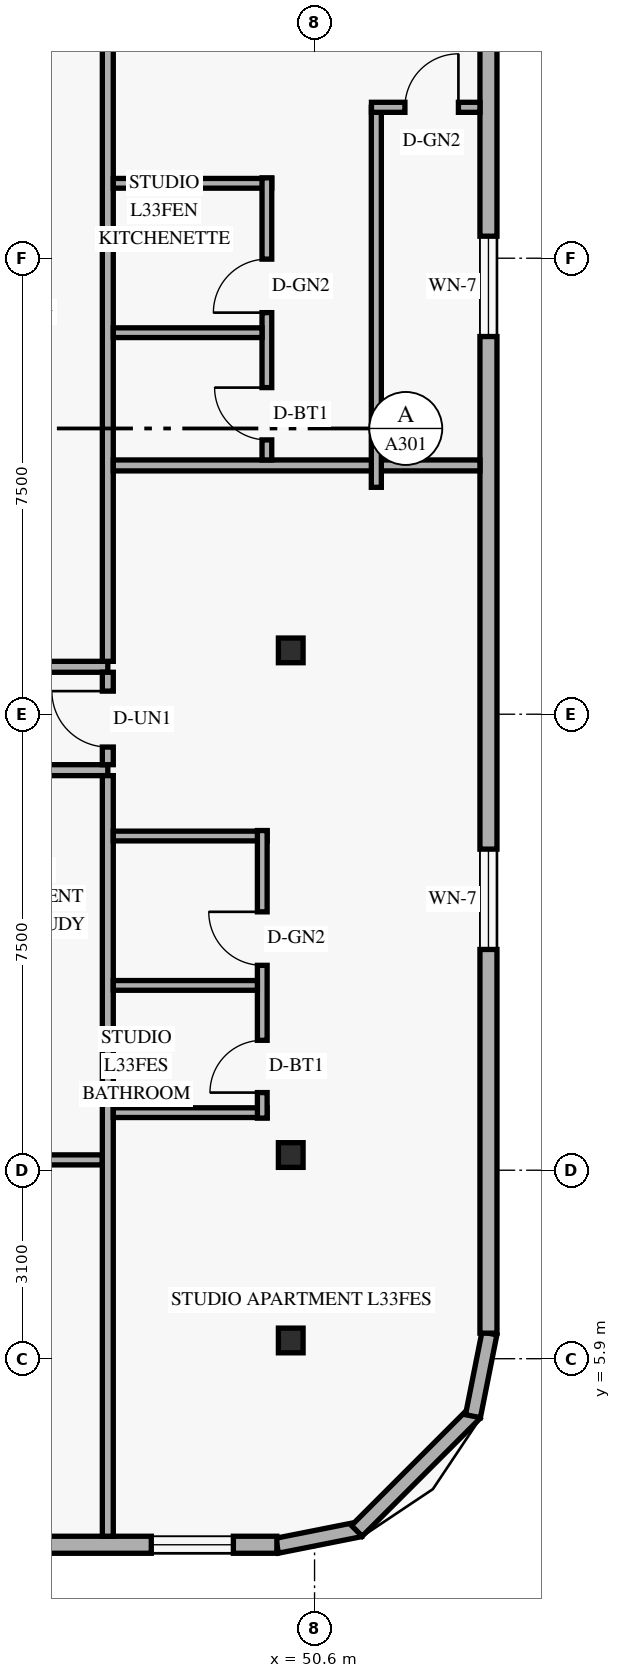
"""IFC4 building model, lengths in metres.
Left out: names, types, materials, properties, quantities, classifications, styles, units other than length and angle.
Written with IfcOpenShell. Run it as: python <this file> out.ifc"""

import sys

from ifc_helpers import new_model, si_unit, direction, frame, frame_2d, origin, origin_2d, place, context, subcontext, project, spatial, rectangle, hollow_rectangle, extrude, element, fill, save


model = new_model("IFC4")
c1 = context("Model", 3, precision=1e-05, world=origin(), true_north=direction((0.0, 1.0)))
c2 = subcontext(c1, "Body", "Model", "MODEL_VIEW")
j1 = project(units=[si_unit("LENGTHUNIT", "METRE"), si_unit("PLANEANGLEUNIT", "RADIAN")], contexts=[c1])
p1 = place(None, origin())
s1 = spatial("IfcSite", under=j1, at=p1, CompositionType="ELEMENT")
p2 = place(p1, origin())
s2 = spatial("IfcBuilding", under=s1, at=p2, CompositionType="ELEMENT")
p3 = place(p2, frame((0.0, 0.0, 128.4)))
s3 = spatial("IfcBuildingStorey", under=s2, at=p3, CompositionType="ELEMENT", Elevation=128.4)
for number, where, z_axis, x_axis in (
    (1, (50.104, 6.2, 0.0), (0.058, 0.0, 0.998), (0.0, 1.0, 0.0)),
    (2, (50.104, 9.25, 0.0), (0.058, 0.0, 0.998), (0.0, 1.0, 0.0)),
    (3, (50.104, 17.55, 0.0), (0.058, 0.0, 0.998), (0.0, 1.0, 0.0)),
):
    element("IfcColumn", number, at=place(p3, frame(where, z_axis=z_axis, x_axis=x_axis)), inside=s3, PredefinedType="COLUMN", context=c2, shape_type="SweptSolid", body=[
        extrude(hollow_rectangle(XDim=0.406, YDim=0.406, WallThickness=0.016, at=origin_2d()), origin(), (0.0, 0.0, 1.0), 3.606),
    ])
p4 = place(p3, frame((49.983, 2.824, 0.0), z_axis=(0.0, 0.0, 1.0), x_axis=(0.980809899341, 0.19496651342, 0.0)))
e4 = element("IfcWall", 4, at=p4, inside=s3, PredefinedType="SOLIDWALL", context=c2, shape_type="SweptSolid", body=[
    extrude(rectangle(XDim=1.389, YDim=0.25, at=frame_2d((0.694, 0.0))), origin(), (0.0, 0.0, 1.0), 3.36),
])
p5 = place(p3, frame((51.295, 3.068, 0.0), z_axis=(0.0, 0.0, 1.0), x_axis=(0.707151344399, 0.707062215165, 0.0)))
e5 = element("IfcWall", 5, at=p5, inside=s3, PredefinedType="SOLIDWALL", context=c2, shape_type="SweptSolid", body=[
    extrude(rectangle(XDim=2.739, YDim=0.25, at=frame_2d((1.37, 0.0))), origin(), (0.0, 0.0, 1.0), 3.36),
])
p6 = place(p3, frame((53.205, 4.955, 0.0), z_axis=(0.0, 0.0, 1.0), x_axis=(0.195000137217, 0.980803214965, 0.0)))
e6 = element("IfcWall", 6, at=p6, inside=s3, PredefinedType="SOLIDWALL", context=c2, shape_type="SweptSolid", body=[
    extrude(rectangle(XDim=1.388, YDim=0.25, at=frame_2d((0.694, 0.0))), origin(), (0.0, 0.0, 1.0), 3.36),
])
p7 = place(p3, frame((13.42, 2.84, 0.0), z_axis=(0.0, 0.0, 1.0), x_axis=(1.0, 0.0, 0.0)))
e7 = element("IfcWall", 7, at=p7, inside=s3, PredefinedType="SOLIDWALL", context=c2, shape_type="SweptSolid", body=[
    extrude(rectangle(XDim=36.56, YDim=0.28, at=frame_2d((18.28, 0.0))), origin(), (0.0, 0.0, 1.0), 3.36),
])
p8 = place(p7, frame((4.07, 0.0, 0.85)))
e8 = element("IfcOpeningElement", 8, at=p8, cuts=e7, PredefinedType="OPENING", context=c2, shape_type="SweptSolid", body=[
    extrude(rectangle(XDim=1.35, YDim=1.55, at=frame_2d((0.675, 0.775))), frame((0.0, 0.15, 0.0), z_axis=(0.0, -1.0, 0.0), x_axis=(1.0, 0.0, 0.0)), (0.0, 0.0, 1.0), 0.3),
])
p9 = place(p7, frame((9.93, 0.0, 0.85)))
e9 = element("IfcOpeningElement", 9, at=p9, cuts=e7, PredefinedType="OPENING", context=c2, shape_type="SweptSolid", body=[
    extrude(rectangle(XDim=1.35, YDim=1.55, at=frame_2d((0.675, 0.775))), frame((0.0, 0.15, 0.0), z_axis=(0.0, -1.0, 0.0), x_axis=(1.0, 0.0, 0.0)), (0.0, 0.0, 1.0), 0.3),
])
p10 = place(p7, frame((16.815, 0.0, 0.85)))
e10 = element("IfcOpeningElement", 10, at=p10, cuts=e7, PredefinedType="OPENING", context=c2, shape_type="SweptSolid", body=[
    extrude(rectangle(XDim=1.35, YDim=1.55, at=frame_2d((0.675, 0.775))), frame((0.0, 0.15, 0.0), z_axis=(0.0, -1.0, 0.0), x_axis=(1.0, 0.0, 0.0)), (0.0, 0.0, 1.0), 0.3),
])
p11 = place(p7, frame((22.39, 0.0, 0.85)))
e11 = element("IfcOpeningElement", 11, at=p11, cuts=e7, PredefinedType="OPENING", context=c2, shape_type="SweptSolid", body=[
    extrude(rectangle(XDim=1.35, YDim=1.55, at=frame_2d((0.675, 0.775))), frame((0.0, 0.15, 0.0), z_axis=(0.0, -1.0, 0.0), x_axis=(1.0, 0.0, 0.0)), (0.0, 0.0, 1.0), 0.3),
])
p12 = place(p7, frame((26.55, 0.0, 0.85)))
e12 = element("IfcOpeningElement", 12, at=p12, cuts=e7, PredefinedType="OPENING", context=c2, shape_type="SweptSolid", body=[
    extrude(rectangle(XDim=1.35, YDim=1.55, at=frame_2d((0.675, 0.775))), frame((0.0, 0.15, 0.0), z_axis=(0.0, -1.0, 0.0), x_axis=(1.0, 0.0, 0.0)), (0.0, 0.0, 1.0), 0.3),
])
p13 = place(p7, frame((31.375, 0.0, 0.85)))
e13 = element("IfcOpeningElement", 13, at=p13, cuts=e7, PredefinedType="OPENING", context=c2, shape_type="SweptSolid", body=[
    extrude(rectangle(XDim=1.35, YDim=1.55, at=frame_2d((0.675, 0.775))), frame((0.0, 0.15, 0.0), z_axis=(0.0, -1.0, 0.0), x_axis=(1.0, 0.0, 0.0)), (0.0, 0.0, 1.0), 0.3),
])
p14 = place(p7, frame((34.495, 0.0, 0.85)))
e14 = element("IfcOpeningElement", 14, at=p14, cuts=e7, PredefinedType="OPENING", context=c2, shape_type="SweptSolid", body=[
    extrude(rectangle(XDim=1.35, YDim=1.55, at=frame_2d((0.675, 0.775))), frame((0.0, 0.15, 0.0), z_axis=(0.0, -1.0, 0.0), x_axis=(1.0, 0.0, 0.0)), (0.0, 0.0, 1.0), 0.3),
])
p15 = place(p3, frame((53.46, 6.32, 0.0), z_axis=(0.0, 0.0, 1.0), x_axis=(0.0, 1.0, 0.0)))
e15 = element("IfcWall", 15, at=p15, inside=s3, PredefinedType="SOLIDWALL", context=c2, shape_type="SweptSolid", body=[
    extrude(rectangle(XDim=35.36, YDim=0.28, at=frame_2d((17.68, 0.0))), origin(), (0.0, 0.0, 1.0), 3.36),
])
p16 = place(p15, frame((6.311, 0.0, 0.85)))
e16 = element("IfcOpeningElement", 16, at=p16, cuts=e15, PredefinedType="OPENING", context=c2, shape_type="SweptSolid", body=[
    extrude(rectangle(XDim=1.65, YDim=1.6, at=frame_2d((0.825, 0.8))), frame((0.0, 0.15, 0.0), z_axis=(0.0, -1.0, 0.0), x_axis=(1.0, 0.0, 0.0)), (0.0, 0.0, 1.0), 0.3),
])
p17 = place(p15, frame((16.392, 0.0, 0.85)))
e17 = element("IfcOpeningElement", 17, at=p17, cuts=e15, PredefinedType="OPENING", context=c2, shape_type="SweptSolid", body=[
    extrude(rectangle(XDim=1.65, YDim=1.6, at=frame_2d((0.825, 0.8))), frame((0.0, 0.15, 0.0), z_axis=(0.0, -1.0, 0.0), x_axis=(1.0, 0.0, 0.0)), (0.0, 0.0, 1.0), 0.3),
])
p18 = place(p15, frame((26.936, 0.0, 0.85)))
e18 = element("IfcOpeningElement", 18, at=p18, cuts=e15, PredefinedType="OPENING", context=c2, shape_type="SweptSolid", body=[
    extrude(rectangle(XDim=1.65, YDim=1.6, at=frame_2d((0.825, 0.8))), frame((0.0, 0.15, 0.0), z_axis=(0.0, -1.0, 0.0), x_axis=(1.0, 0.0, 0.0)), (0.0, 0.0, 1.0), 0.3),
])
p19 = place(p3, frame((37.633, 15.58, 0.0), z_axis=(0.0, 0.0, 1.0), x_axis=(1.0, 0.0, 0.0)))
e19 = element("IfcWall", 19, at=p19, inside=s3, PredefinedType="STANDARD", context=c2, shape_type="SweptSolid", body=[
    extrude(rectangle(XDim=9.567, YDim=0.18, at=frame_2d((4.784, 0.0))), origin(), (0.0, 0.0, 1.0), 2.731),
])
p20 = place(p19, frame((0.327, 0.0, 0.0)))
e20 = element("IfcOpeningElement", 20, at=p20, cuts=e19, PredefinedType="OPENING", context=c2, shape_type="SweptSolid", body=[
    extrude(rectangle(XDim=0.92, YDim=2.15, at=frame_2d((0.46, 1.075))), frame((0.0, 0.1, 0.0), z_axis=(0.0, -1.0, 0.0), x_axis=(1.0, 0.0, 0.0)), (0.0, 0.0, 1.0), 0.2),
])
p21 = place(p3, frame((37.64, 17.28, 0.0), z_axis=(0.0, 0.0, 1.0), x_axis=(1.0, 0.0, 0.0)))
e21 = element("IfcWall", 21, at=p21, inside=s3, PredefinedType="STANDARD", context=c2, shape_type="SweptSolid", body=[
    extrude(rectangle(XDim=9.56, YDim=0.18, at=frame_2d((4.78, 0.0))), origin(), (0.0, 0.0, 1.0), 2.731),
])
p22 = place(p21, frame((7.528, 0.0, 0.0)))
e22 = element("IfcOpeningElement", 22, at=p22, cuts=e21, PredefinedType="OPENING", context=c2, shape_type="SweptSolid", body=[
    extrude(rectangle(XDim=0.92, YDim=2.15, at=frame_2d((0.46, 1.075))), frame((0.0, 0.1, 0.0), z_axis=(0.0, -1.0, 0.0), x_axis=(1.0, 0.0, 0.0)), (0.0, 0.0, 1.0), 0.2),
])
p23 = place(p3, frame((43.82, 9.17, 0.0), z_axis=(0.0, 0.0, 1.0), x_axis=(1.0, 0.0, 0.0)))
e23 = element("IfcWall", 23, at=p23, inside=s3, PredefinedType="PARTITIONING", context=c2, shape_type="SweptSolid", body=[
    extrude(rectangle(XDim=3.29, YDim=0.165, at=frame_2d((1.645, 0.0))), origin(), (0.0, 0.0, 1.0), 2.731),
])
p24 = place(p3, frame((47.2, 15.67, 0.0), z_axis=(0.0, 0.0, 1.0), x_axis=(0.0, 1.0, 0.0)))
e24 = element("IfcWall", 24, at=p24, inside=s3, PredefinedType="STANDARD", context=c2, shape_type="SweptSolid", body=[
    extrude(rectangle(XDim=1.52, YDim=0.18, at=frame_2d((0.76, 0.0))), origin(), (0.0, 0.0, 1.0), 3.36),
])
p25 = place(p24, frame((0.29, 0.0, 0.0)))
e25 = element("IfcOpeningElement", 25, at=p25, cuts=e24, PredefinedType="OPENING", context=c2, shape_type="SweptSolid", body=[
    extrude(rectangle(XDim=0.92, YDim=2.15, at=frame_2d((0.46, 1.075))), frame((0.0, 0.1, 0.0), z_axis=(0.0, -1.0, 0.0), x_axis=(1.0, 0.0, 0.0)), (0.0, 0.0, 1.0), 0.2),
])
p26 = place(p3, frame((47.2, 2.98, 0.0), z_axis=(0.0, 0.0, 1.0), x_axis=(0.0, 1.0, 0.0)))
e26 = element("IfcWall", 26, at=p26, inside=s3, PredefinedType="PARTITIONING", context=c2, shape_type="SweptSolid", body=[
    extrude(rectangle(XDim=12.51, YDim=0.18, at=frame_2d((6.255, 0.0))), origin(), (0.0, 0.0, 1.0), 2.731),
])
p27 = place(p3, frame((47.2, 17.37, 0.0), z_axis=(0.0, 0.0, 1.0), x_axis=(0.0, 1.0, 0.0)))
e27 = element("IfcWall", 27, at=p27, inside=s3, PredefinedType="PARTITIONING", context=c2, shape_type="SweptSolid", body=[
    extrude(rectangle(XDim=10.1, YDim=0.18, at=frame_2d((5.05, 0.0))), origin(), (0.0, 0.0, 1.0), 2.731),
])
p28 = place(p3, frame((47.29, 20.592, 0.0), z_axis=(0.0, 0.0, 1.0), x_axis=(1.0, 0.0, 0.0)))
e28 = element("IfcWall", 28, at=p28, inside=s3, PredefinedType="PARTITIONING", context=c2, shape_type="SweptSolid", body=[
    extrude(rectangle(XDim=6.03, YDim=0.18, at=frame_2d((3.015, 0.0))), origin(), (0.0, 0.0, 1.0), 2.809),
])
for number, where, z_axis, x_axis in (
    (29, (47.29, 9.947, 0.0), (0.0, 0.0, 1.0), (1.0, 0.0, 0.0)),
    (30, (47.29, 14.497, 0.0), (0.0, 0.0, 1.0), (1.0, 0.0, 0.0)),
):
    element("IfcWall", number, at=place(p3, frame(where, z_axis=z_axis, x_axis=x_axis)), inside=s3, PredefinedType="PLUMBINGWALL", context=c2, shape_type="SweptSolid", body=[
        extrude(rectangle(XDim=2.53, YDim=0.16, at=frame_2d((1.265, 0.0))), origin(), (0.0, 0.0, 1.0), 3.36),
    ])
p29 = place(p3, frame((49.74, 9.857, 0.0), z_axis=(0.0, 0.0, 1.0), x_axis=(0.0, 1.0, 0.0)))
e31 = element("IfcWall", 31, at=p29, inside=s3, PredefinedType="PLUMBINGWALL", context=c2, shape_type="SweptSolid", body=[
    extrude(rectangle(XDim=4.73, YDim=0.16, at=frame_2d((2.365, 0.0))), origin(), (0.0, 0.0, 1.0), 2.988),
])
p30 = place(p29, frame((0.42, 0.0, 0.0)))
e32 = element("IfcOpeningElement", 32, at=p30, cuts=e31, PredefinedType="OPENING", context=c2, shape_type="SweptSolid", body=[
    extrude(rectangle(XDim=0.86, YDim=2.12, at=frame_2d((0.43, 1.06))), frame((0.0, 0.09, 0.0), z_axis=(0.0, -1.0, 0.0), x_axis=(1.0, 0.0, 0.0)), (0.0, 0.0, 1.0), 0.18),
])
p31 = place(p29, frame((2.513, 0.0, 0.0)))
e33 = element("IfcOpeningElement", 33, at=p31, cuts=e31, PredefinedType="OPENING", context=c2, shape_type="SweptSolid", body=[
    extrude(rectangle(XDim=0.88, YDim=2.12, at=frame_2d((0.44, 1.06))), frame((0.0, 0.09, 0.0), z_axis=(0.0, -1.0, 0.0), x_axis=(1.0, 0.0, 0.0)), (0.0, 0.0, 1.0), 0.18),
])
p32 = place(p3, frame((47.29, 12.04, 0.0), z_axis=(0.0, 0.0, 1.0), x_axis=(1.0, 0.0, 0.0)))
e34 = element("IfcWall", 34, at=p32, inside=s3, PredefinedType="PLUMBINGWALL", context=c2, shape_type="SweptSolid", body=[
    extrude(rectangle(XDim=2.37, YDim=0.16, at=frame_2d((1.185, 0.0))), origin(), (0.0, 0.0, 1.0), 3.36),
])
p33 = place(p3, frame((47.29, 25.232, 0.0), z_axis=(0.0, 0.0, 1.0), x_axis=(1.0, 0.0, 0.0)))
e35 = element("IfcWall", 35, at=p33, inside=s3, PredefinedType="PLUMBINGWALL", context=c2, shape_type="SweptSolid", body=[
    extrude(rectangle(XDim=2.606, YDim=0.16, at=frame_2d((1.303, 0.0))), origin(), (0.0, 0.0, 1.0), 3.36),
])
p34 = place(p3, frame((49.816, 20.682, 0.0), z_axis=(0.0, 0.0, 1.0), x_axis=(0.0, 1.0, 0.0)))
e36 = element("IfcWall", 36, at=p34, inside=s3, PredefinedType="PLUMBINGWALL", context=c2, shape_type="SweptSolid", body=[
    extrude(rectangle(XDim=4.64, YDim=0.16, at=frame_2d((2.32, 0.0))), origin(), (0.0, 0.0, 1.0), 3.36),
])
p35 = place(p34, frame((0.33, 0.0, 0.0)))
e37 = element("IfcOpeningElement", 37, at=p35, cuts=e36, PredefinedType="OPENING", context=c2, shape_type="SweptSolid", body=[
    extrude(rectangle(XDim=0.86, YDim=2.12, at=frame_2d((0.43, 1.06))), frame((0.0, 0.09, 0.0), z_axis=(0.0, -1.0, 0.0), x_axis=(1.0, 0.0, 0.0)), (0.0, 0.0, 1.0), 0.18),
])
p36 = place(p34, frame((2.423, 0.0, 0.0)))
e38 = element("IfcOpeningElement", 38, at=p36, cuts=e36, PredefinedType="OPENING", context=c2, shape_type="SweptSolid", body=[
    extrude(rectangle(XDim=0.88, YDim=2.12, at=frame_2d((0.44, 1.06))), frame((0.0, 0.09, 0.0), z_axis=(0.0, -1.0, 0.0), x_axis=(1.0, 0.0, 0.0)), (0.0, 0.0, 1.0), 0.18),
])
p37 = place(p3, frame((47.29, 22.775, 0.0), z_axis=(0.0, 0.0, 1.0), x_axis=(1.0, 0.0, 0.0)))
e39 = element("IfcWall", 39, at=p37, inside=s3, PredefinedType="PLUMBINGWALL", context=c2, shape_type="SweptSolid", body=[
    extrude(rectangle(XDim=2.446, YDim=0.16, at=frame_2d((1.223, 0.0))), origin(), (0.0, 0.0, 1.0), 3.36),
])
p38 = place(p3, frame((51.616, 20.232, 0.0), z_axis=(0.0, 0.0, 1.0), x_axis=(0.0, 1.0, 0.0)))
e40 = element("IfcWall", 40, at=p38, inside=s3, PredefinedType="PARTITIONING", context=c2, shape_type="SweptSolid", body=[
    extrude(rectangle(XDim=6.25, YDim=0.165, at=frame_2d((3.125, 0.0))), origin(), (0.0, 0.0, 1.0), 3.36),
])
p39 = place(p3, frame((51.536, 26.482, 0.0), z_axis=(0.0, 0.0, 1.0), x_axis=(1.0, 0.0, 0.0)))
e41 = element("IfcWall", 41, at=p39, inside=s3, PredefinedType="PARTITIONING", context=c2, shape_type="SweptSolid", body=[
    extrude(rectangle(XDim=1.784, YDim=0.165, at=frame_2d((0.892, 0.0))), origin(), (0.0, 0.0, 1.0), 3.36),
])
p40 = place(p39, frame((0.55, 0.0, 0.0)))
e42 = element("IfcOpeningElement", 42, at=p40, cuts=e41, PredefinedType="OPENING", context=c2, shape_type="SweptSolid", body=[
    extrude(rectangle(XDim=0.88, YDim=2.12, at=frame_2d((0.44, 1.06))), frame((0.0, 0.093, 0.0), z_axis=(0.0, -1.0, 0.0), x_axis=(1.0, 0.0, 0.0)), (0.0, 0.0, 1.0), 0.185),
])
p41 = place(p14, origin())
e43 = element("IfcWindow", 43, at=p41, inside=s3, PartitioningType="SINGLE_PANEL", PredefinedType="WINDOW", context=c2, shape_type="SweptSolid", body=[
    extrude(rectangle(XDim=1.35, YDim=1.55, at=frame_2d((0.675, 0.775))), frame((0.0, 0.03, 0.0), z_axis=(0.0, -1.0, 0.0), x_axis=(1.0, 0.0, 0.0)), (0.0, 0.0, 1.0), 0.06),
])
fill(e14, e43)
p42 = place(p16, origin())
e44 = element("IfcWindow", 44, at=p42, inside=s3, PartitioningType="SINGLE_PANEL", PredefinedType="WINDOW", context=c2, shape_type="SweptSolid", body=[
    extrude(rectangle(XDim=1.65, YDim=1.6, at=frame_2d((0.825, 0.8))), frame((0.0, 0.03, 0.0), z_axis=(0.0, -1.0, 0.0), x_axis=(1.0, 0.0, 0.0)), (0.0, 0.0, 1.0), 0.06),
])
fill(e16, e44)
p43 = place(p17, origin())
e45 = element("IfcWindow", 45, at=p43, inside=s3, PartitioningType="SINGLE_PANEL", PredefinedType="WINDOW", context=c2, shape_type="SweptSolid", body=[
    extrude(rectangle(XDim=1.65, YDim=1.6, at=frame_2d((0.825, 0.8))), frame((0.0, 0.03, 0.0), z_axis=(0.0, -1.0, 0.0), x_axis=(1.0, 0.0, 0.0)), (0.0, 0.0, 1.0), 0.06),
])
fill(e17, e45)
p44 = place(p25, origin())
e46 = element("IfcDoor", 46, at=p44, inside=s3, OperationType="SINGLE_SWING_RIGHT", PredefinedType="DOOR", context=c2, shape_type="SweptSolid", body=[
    extrude(rectangle(XDim=0.92, YDim=2.15, at=frame_2d((0.46, 1.075))), frame((0.0, 0.025, 0.0), z_axis=(0.0, -1.0, 0.0), x_axis=(1.0, 0.0, 0.0)), (0.0, 0.0, 1.0), 0.05),
])
fill(e25, e46)
p45 = place(p30, origin())
e47 = element("IfcDoor", 47, at=p45, inside=s3, OperationType="SINGLE_SWING_LEFT", PredefinedType="DOOR", context=c2, shape_type="SweptSolid", body=[
    extrude(rectangle(XDim=0.86, YDim=2.12, at=frame_2d((0.43, 1.06))), frame((0.0, 0.025, 0.0), z_axis=(0.0, -1.0, 0.0), x_axis=(1.0, 0.0, 0.0)), (0.0, 0.0, 1.0), 0.05),
])
fill(e32, e47)
p46 = place(p31, origin())
e48 = element("IfcDoor", 48, at=p46, inside=s3, OperationType="SINGLE_SWING_RIGHT", PredefinedType="DOOR", context=c2, shape_type="SweptSolid", body=[
    extrude(rectangle(XDim=0.88, YDim=2.12, at=frame_2d((0.44, 1.06))), frame((0.0, 0.025, 0.0), z_axis=(0.0, -1.0, 0.0), x_axis=(1.0, 0.0, 0.0)), (0.0, 0.0, 1.0), 0.05),
])
fill(e33, e48)
p47 = place(p40, origin())
e49 = element("IfcDoor", 49, at=p47, inside=s3, OperationType="SINGLE_SWING_RIGHT", PredefinedType="DOOR", context=c2, shape_type="SweptSolid", body=[
    extrude(rectangle(XDim=0.88, YDim=2.12, at=frame_2d((0.44, 1.06))), frame((0.0, 0.025, 0.0), z_axis=(0.0, -1.0, 0.0), x_axis=(1.0, 0.0, 0.0)), (0.0, 0.0, 1.0), 0.05),
])
fill(e42, e49)
p48 = place(p35, origin())
e50 = element("IfcDoor", 50, at=p48, inside=s3, OperationType="SINGLE_SWING_RIGHT", PredefinedType="DOOR", context=c2, shape_type="SweptSolid", body=[
    extrude(rectangle(XDim=0.86, YDim=2.12, at=frame_2d((0.43, 1.06))), frame((0.0, 0.025, 0.0), z_axis=(0.0, -1.0, 0.0), x_axis=(1.0, 0.0, 0.0)), (0.0, 0.0, 1.0), 0.05),
])
fill(e37, e50)
p49 = place(p36, origin())
e51 = element("IfcDoor", 51, at=p49, inside=s3, OperationType="SINGLE_SWING_LEFT", PredefinedType="DOOR", context=c2, shape_type="SweptSolid", body=[
    extrude(rectangle(XDim=0.88, YDim=2.12, at=frame_2d((0.44, 1.06))), frame((0.0, 0.025, 0.0), z_axis=(0.0, -1.0, 0.0), x_axis=(1.0, 0.0, 0.0)), (0.0, 0.0, 1.0), 0.05),
])
fill(e38, e51)
save(model, sys.argv[1])
